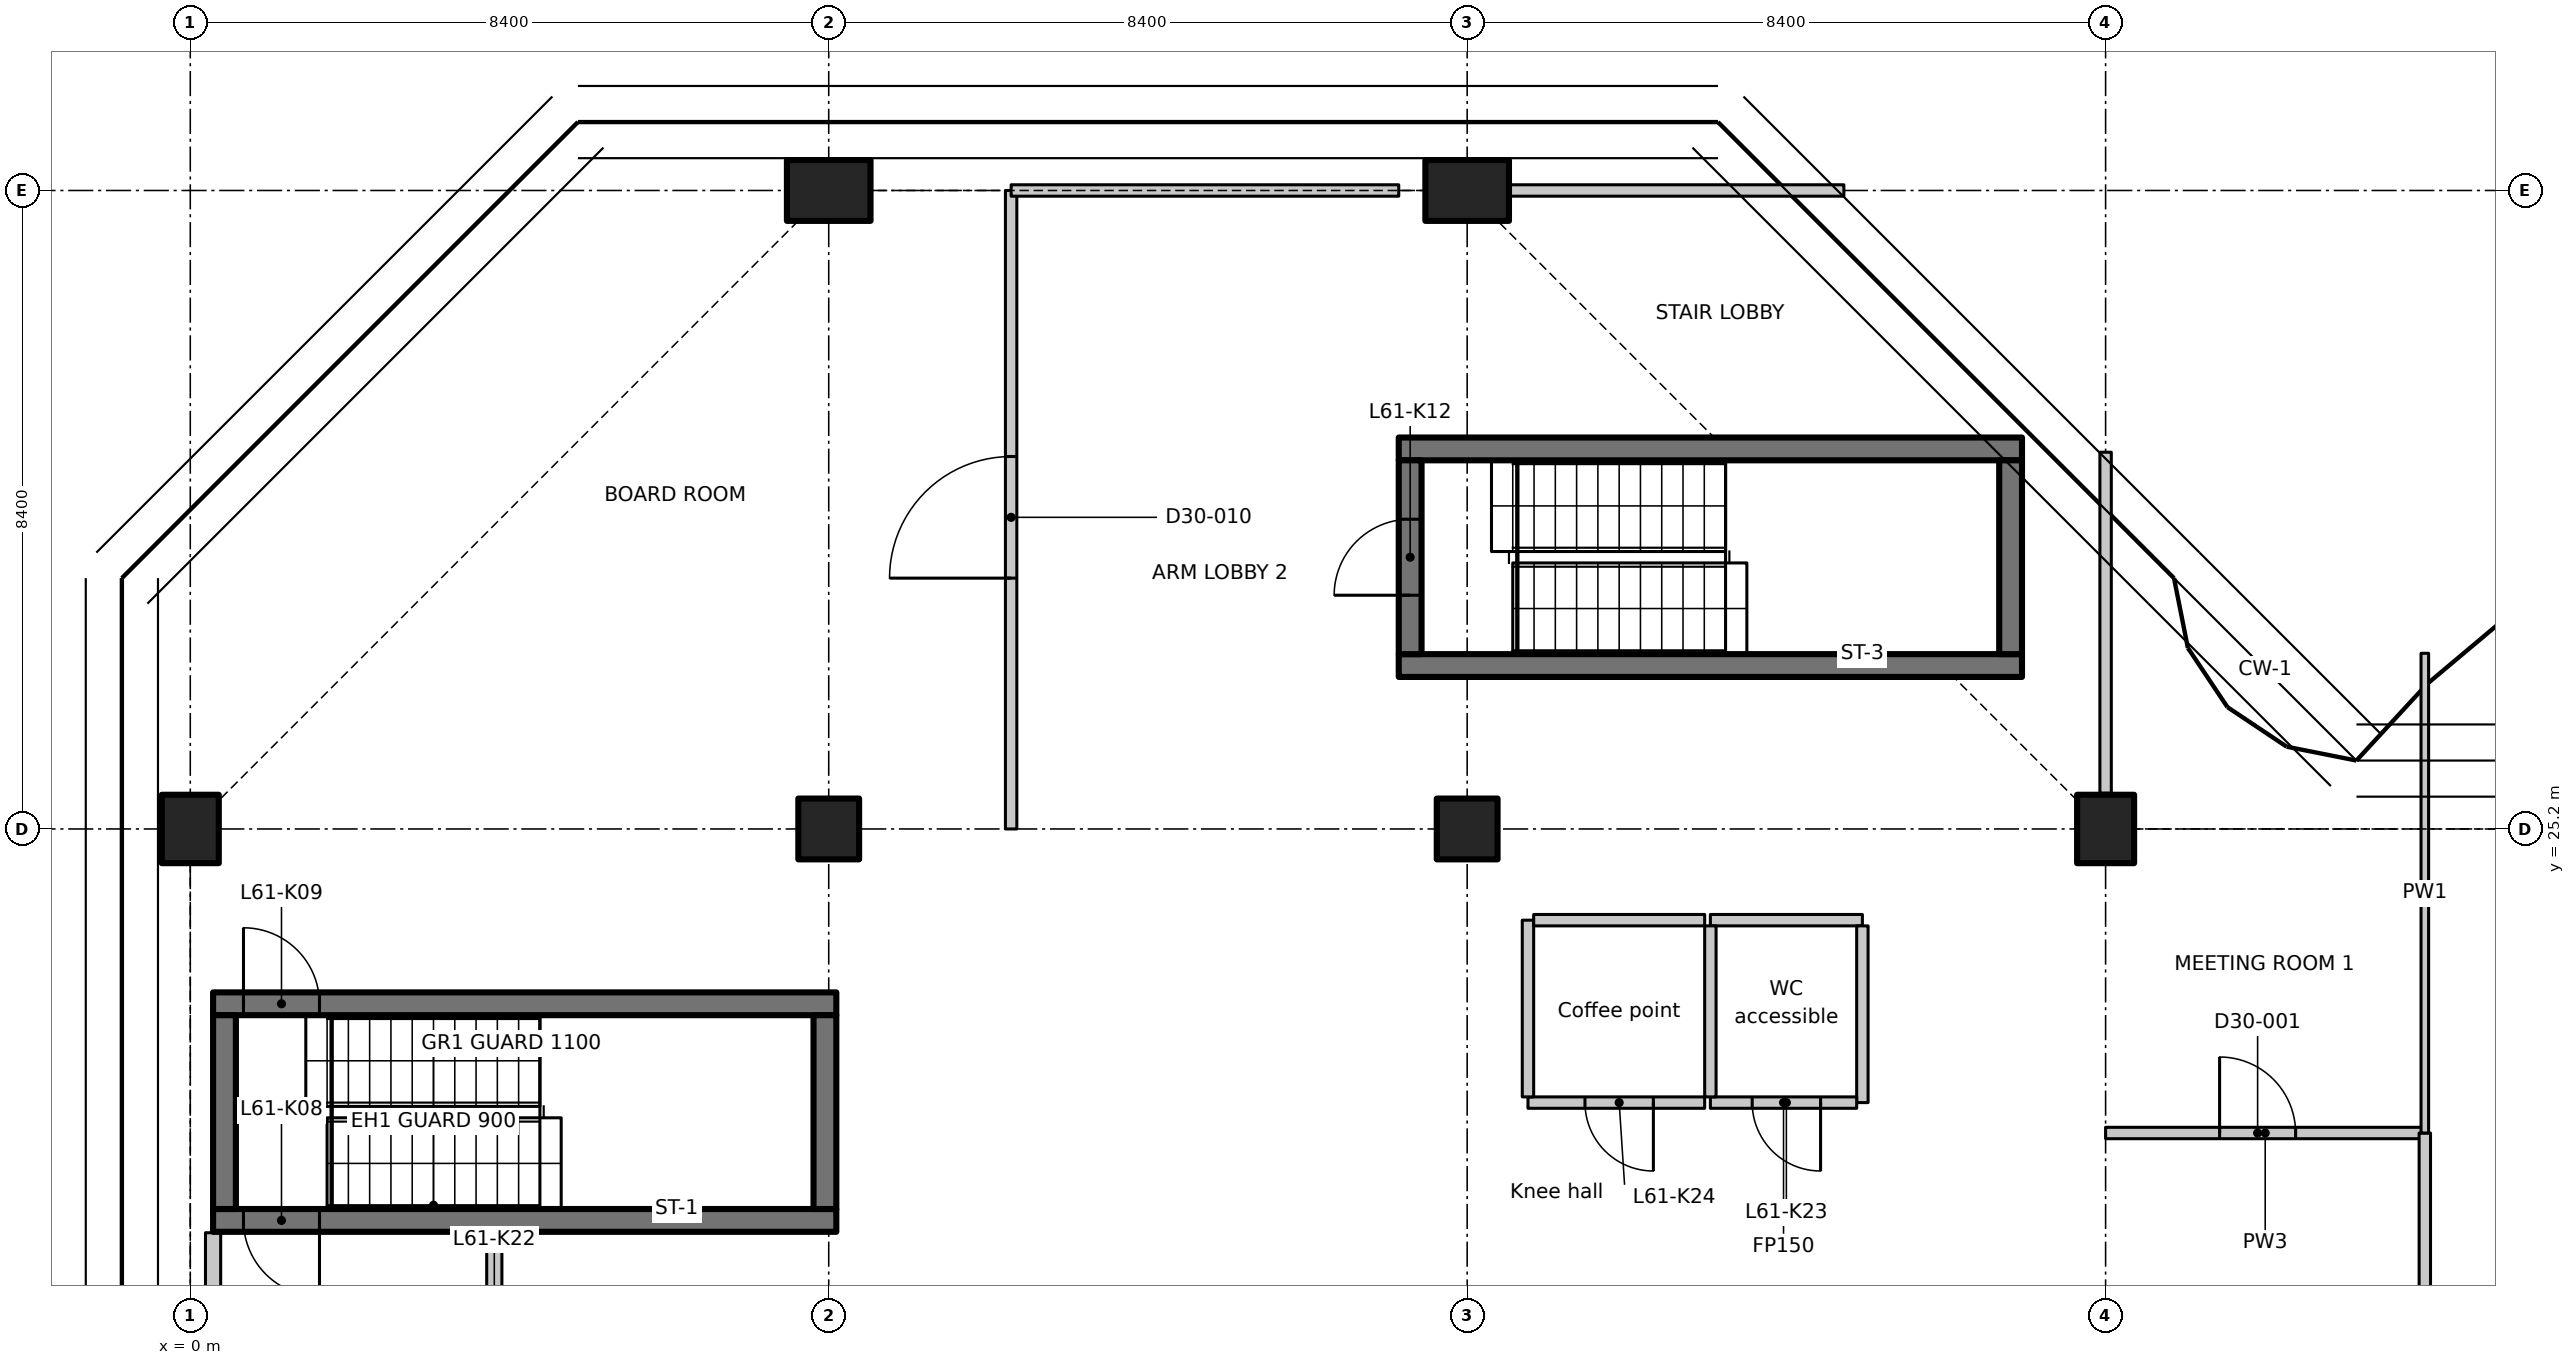
"""IFC4 building model, lengths in metres.
Left out: names, types, materials, properties, quantities, classifications, styles, units other than length and angle.
Written with IfcOpenShell. Run it as: python <this file> out.ifc"""

import sys

from ifc_helpers import new_model, si_unit, direction, frame, frame_2d, origin, origin_2d, place, context, subcontext, project, spatial, polyline, rectangle, outline, extrude, element, fill, save


model = new_model("IFC4")
c1 = context("Model", 3, precision=1e-05, world=origin(), true_north=direction((0.0, 1.0)))
c2 = subcontext(c1, "Body", "Model", "MODEL_VIEW")
j1 = project(units=[si_unit("LENGTHUNIT", "METRE"), si_unit("PLANEANGLEUNIT", "RADIAN")], contexts=[c1])
p1 = place(None, origin())
s1 = spatial("IfcSite", under=j1, at=p1, CompositionType="ELEMENT")
p2 = place(p1, origin())
s2 = spatial("IfcBuilding", under=s1, at=p2, CompositionType="ELEMENT")
p3 = place(p2, frame((0.0, 0.0, 240.9)))
s3 = spatial("IfcBuildingStorey", under=s2, at=p3, CompositionType="ELEMENT", Elevation=240.9)
p4 = place(p3, frame((0.0, 25.2, 0.0), z_axis=(0.0, 0.0, 1.0), x_axis=(1.0, 0.0, 0.0)))
e1 = element("IfcColumn", 1, at=p4, inside=s3, PredefinedType="COLUMN", context=c2, shape_type="SweptSolid", body=[
    extrude(rectangle(XDim=0.75, YDim=0.9, at=origin_2d()), origin(), (0.0, 0.0, 1.0), 3.35),
])
p5 = place(p3, frame((8.4, 25.2, 0.0), z_axis=(0.0, 0.0, 1.0), x_axis=(1.0, 0.0, 0.0)))
e2 = element("IfcColumn", 2, at=p5, inside=s3, PredefinedType="COLUMN", context=c2, shape_type="SweptSolid", body=[
    extrude(rectangle(XDim=0.8, YDim=0.8, at=origin_2d()), origin(), (0.0, 0.0, 1.0), 3.35),
])
p6 = place(p3, frame((8.4, 33.6, 0.0), z_axis=(0.0, 0.0, 1.0), x_axis=(0.0, 1.0, 0.0)))
e3 = element("IfcColumn", 3, at=p6, inside=s3, PredefinedType="COLUMN", context=c2, shape_type="SweptSolid", body=[
    extrude(rectangle(XDim=0.8, YDim=1.1, at=origin_2d()), origin(), (0.0, 0.0, 1.0), 3.35),
])
p7 = place(p3, frame((16.8, 25.2, 0.0), z_axis=(0.0, 0.0, 1.0), x_axis=(1.0, 0.0, 0.0)))
e4 = element("IfcColumn", 4, at=p7, inside=s3, PredefinedType="COLUMN", context=c2, shape_type="SweptSolid", body=[
    extrude(rectangle(XDim=0.8, YDim=0.8, at=origin_2d()), origin(), (0.0, 0.0, 1.0), 3.35),
])
p8 = place(p3, frame((16.8, 33.6, 0.0), z_axis=(0.0, 0.0, 1.0), x_axis=(0.0, 1.0, 0.0)))
e5 = element("IfcColumn", 5, at=p8, inside=s3, PredefinedType="COLUMN", context=c2, shape_type="SweptSolid", body=[
    extrude(rectangle(XDim=0.8, YDim=1.1, at=origin_2d()), origin(), (0.0, 0.0, 1.0), 3.35),
])
p9 = place(p3, frame((25.2, 25.2, 0.0), z_axis=(0.0, 0.0, 1.0), x_axis=(1.0, 0.0, 0.0)))
e6 = element("IfcColumn", 6, at=p9, inside=s3, PredefinedType="COLUMN", context=c2, shape_type="SweptSolid", body=[
    extrude(rectangle(XDim=0.75, YDim=0.9, at=origin_2d()), origin(), (0.0, 0.0, 1.0), 3.35),
])
p10 = place(p3, frame((8.5, 20.05, 0.0), z_axis=(0.0, 0.0, 1.0), x_axis=(-1.0, 0.0, 0.0)))
e7 = element("IfcWall", 7, at=p10, inside=s3, PredefinedType="SHEAR", context=c2, shape_type="SweptSolid", body=[
    extrude(rectangle(XDim=8.2, YDim=0.3, at=frame_2d((4.1, 0.0))), origin(), (0.0, 0.0, 1.0), 3.35),
])
p11 = place(p10, frame((6.8, 0.0, 0.0)))
e8 = element("IfcOpeningElement", 8, at=p11, cuts=e7, PredefinedType="OPENING", context=c2, shape_type="SweptSolid", body=[
    extrude(rectangle(XDim=1.0, YDim=2.1, at=frame_2d((0.5, 1.05))), frame((0.0, 0.16, 0.0), z_axis=(0.0, -1.0, 0.0), x_axis=(1.0, 0.0, 0.0)), (0.0, 0.0, 1.0), 0.32),
])
p12 = place(p3, frame((0.3, 22.9, 0.0), z_axis=(0.0, 0.0, 1.0), x_axis=(1.0, 0.0, 0.0)))
e9 = element("IfcWall", 9, at=p12, inside=s3, PredefinedType="SHEAR", context=c2, shape_type="SweptSolid", body=[
    extrude(rectangle(XDim=8.2, YDim=0.3, at=frame_2d((4.1, 0.0))), origin(), (0.0, 0.0, 1.0), 3.35),
])
p13 = place(p12, frame((0.4, 0.0, 0.0)))
e10 = element("IfcOpeningElement", 10, at=p13, cuts=e9, PredefinedType="OPENING", context=c2, shape_type="SweptSolid", body=[
    extrude(rectangle(XDim=1.0, YDim=2.1, at=frame_2d((0.5, 1.05))), frame((0.0, 0.16, 0.0), z_axis=(0.0, -1.0, 0.0), x_axis=(1.0, 0.0, 0.0)), (0.0, 0.0, 1.0), 0.32),
])
for number, where, z_axis, x_axis in (
    (11, (0.45, 20.2, 0.0), (0.0, 0.0, 1.0), (0.0, 1.0, 0.0)),
    (12, (8.35, 20.2, 0.0), (0.0, 0.0, 1.0), (0.0, 1.0, 0.0)),
):
    element("IfcWall", number, at=place(p3, frame(where, z_axis=z_axis, x_axis=x_axis)), inside=s3, PredefinedType="SHEAR", context=c2, shape_type="SweptSolid", body=[
        extrude(rectangle(XDim=2.55, YDim=0.3, at=frame_2d((1.275, 0.0))), origin(), (0.0, 0.0, 1.0), 3.35),
    ])
for number, where, z_axis, x_axis in (
    (13, (15.9, 27.35, 0.0), (0.0, 0.0, 1.0), (1.0, 0.0, 0.0)),
    (14, (15.9, 30.2, 0.0), (0.0, 0.0, 1.0), (1.0, 0.0, 0.0)),
):
    element("IfcWall", number, at=place(p3, frame(where, z_axis=z_axis, x_axis=x_axis)), inside=s3, PredefinedType="SHEAR", context=c2, shape_type="SweptSolid", body=[
        extrude(rectangle(XDim=8.2, YDim=0.3, at=frame_2d((4.1, 0.0))), origin(), (0.0, 0.0, 1.0), 3.35),
    ])
p14 = place(p3, frame((16.05, 27.5, 0.0), z_axis=(0.0, 0.0, 1.0), x_axis=(0.0, 1.0, 0.0)))
e15 = element("IfcWall", 15, at=p14, inside=s3, PredefinedType="SHEAR", context=c2, shape_type="SweptSolid", body=[
    extrude(rectangle(XDim=2.55, YDim=0.3, at=frame_2d((1.275, 0.0))), origin(), (0.0, 0.0, 1.0), 3.35),
])
p15 = place(p14, frame((0.775, 0.0, 0.0)))
e16 = element("IfcOpeningElement", 16, at=p15, cuts=e15, PredefinedType="OPENING", context=c2, shape_type="SweptSolid", body=[
    extrude(rectangle(XDim=1.0, YDim=2.1, at=frame_2d((0.5, 1.05))), frame((0.0, 0.16, 0.0), z_axis=(0.0, -1.0, 0.0), x_axis=(1.0, 0.0, 0.0)), (0.0, 0.0, 1.0), 0.32),
])
p16 = place(p3, frame((23.95, 27.5, 0.0), z_axis=(0.0, 0.0, 1.0), x_axis=(0.0, 1.0, 0.0)))
e17 = element("IfcWall", 17, at=p16, inside=s3, PredefinedType="SHEAR", context=c2, shape_type="SweptSolid", body=[
    extrude(rectangle(XDim=2.55, YDim=0.3, at=frame_2d((1.275, 0.0))), origin(), (0.0, 0.0, 1.0), 3.35),
])
p17 = place(p3, frame((0.3, 16.812, 0.0), z_axis=(0.0, 0.0, 1.0), x_axis=(0.0, 1.0, 0.0)))
e18 = element("IfcWall", 18, at=p17, inside=s3, PredefinedType="PARTITIONING", context=c2, shape_type="SweptSolid", body=[
    extrude(rectangle(XDim=3.076, YDim=0.2, at=frame_2d((1.538, 0.0))), origin(), (0.0, 0.0, 1.0), 2.98),
])
p18 = place(p3, frame((4.0, 19.888, 0.0), z_axis=(0.0, 0.0, 1.0), x_axis=(0.0, -1.0, 0.0)))
e19 = element("IfcWall", 19, at=p18, inside=s3, PredefinedType="PARTITIONING", context=c2, shape_type="SweptSolid", body=[
    extrude(rectangle(XDim=3.076, YDim=0.2, at=frame_2d((1.538, 0.0))), origin(), (0.0, 0.0, 1.0), 3.35),
])
p19 = place(p18, frame((1.488, 0.0, 0.0)))
e20 = element("IfcOpeningElement", 20, at=p19, cuts=e19, PredefinedType="OPENING", context=c2, shape_type="SweptSolid", body=[
    extrude(rectangle(XDim=1.0, YDim=2.1, at=frame_2d((0.5, 1.05))), frame((0.0, 0.11, 0.0), z_axis=(0.0, -1.0, 0.0), x_axis=(1.0, 0.0, 0.0)), (0.0, 0.0, 1.0), 0.22),
])
p20 = place(p3, frame((20.0, 24.0, 0.0), z_axis=(0.0, 0.0, 1.0), x_axis=(1.0, 0.0, 0.0)))
e21 = element("IfcWall", 21, at=p20, inside=s3, PredefinedType="PARTITIONING", context=c2, shape_type="SweptSolid", body=[
    extrude(rectangle(XDim=2.0, YDim=0.15, at=frame_2d((1.0, 0.0))), origin(), (0.0, 0.0, 1.0), 3.35),
])
p21 = place(p3, frame((22.0, 23.925, 0.0), z_axis=(0.0, 0.0, 1.0), x_axis=(0.0, -1.0, 0.0)))
e22 = element("IfcWall", 22, at=p21, inside=s3, PredefinedType="PARTITIONING", context=c2, shape_type="SweptSolid", body=[
    extrude(rectangle(XDim=2.325, YDim=0.15, at=frame_2d((1.163, 0.0))), origin(), (0.0, 0.0, 1.0), 3.35),
])
p22 = place(p3, frame((21.925, 21.6, 0.0), z_axis=(0.0, 0.0, 1.0), x_axis=(-1.0, 0.0, 0.0)))
e23 = element("IfcWall", 23, at=p22, inside=s3, PredefinedType="PARTITIONING", context=c2, shape_type="SweptSolid", body=[
    extrude(rectangle(XDim=1.925, YDim=0.15, at=frame_2d((0.962, 0.0))), origin(), (0.0, 0.0, 1.0), 3.35),
])
p23 = place(p22, frame((0.475, 0.0, 0.0)))
e24 = element("IfcOpeningElement", 24, at=p23, cuts=e23, PredefinedType="OPENING", context=c2, shape_type="SweptSolid", body=[
    extrude(rectangle(XDim=0.9, YDim=2.1, at=frame_2d((0.45, 1.05))), frame((0.0, 0.085, 0.0), z_axis=(0.0, -1.0, 0.0), x_axis=(1.0, 0.0, 0.0)), (0.0, 0.0, 1.0), 0.17),
])
p24 = place(p3, frame((20.0, 21.675, 0.0), z_axis=(0.0, 0.0, 1.0), x_axis=(0.0, 1.0, 0.0)))
e25 = element("IfcWall", 25, at=p24, inside=s3, PredefinedType="PARTITIONING", context=c2, shape_type="SweptSolid", body=[
    extrude(rectangle(XDim=2.25, YDim=0.15, at=frame_2d((1.125, 0.0))), origin(), (0.0, 0.0, 1.0), 3.35),
])
p25 = place(p3, frame((19.925, 21.6, 0.0), z_axis=(0.0, 0.0, 1.0), x_axis=(-1.0, 0.0, 0.0)))
e26 = element("IfcWall", 26, at=p25, inside=s3, PredefinedType="PARTITIONING", context=c2, shape_type="SweptSolid", body=[
    extrude(rectangle(XDim=2.325, YDim=0.15, at=frame_2d((1.163, 0.0))), origin(), (0.0, 0.0, 1.0), 3.35),
])
p26 = place(p25, frame((0.675, 0.0, 0.0)))
e27 = element("IfcOpeningElement", 27, at=p26, cuts=e26, PredefinedType="OPENING", context=c2, shape_type="SweptSolid", body=[
    extrude(rectangle(XDim=0.9, YDim=2.1, at=frame_2d((0.45, 1.05))), frame((0.0, 0.085, 0.0), z_axis=(0.0, -1.0, 0.0), x_axis=(1.0, 0.0, 0.0)), (0.0, 0.0, 1.0), 0.17),
])
p27 = place(p3, frame((17.6, 21.675, 0.0), z_axis=(0.0, 0.0, 1.0), x_axis=(0.0, 1.0, 0.0)))
e28 = element("IfcWall", 28, at=p27, inside=s3, PredefinedType="PARTITIONING", context=c2, shape_type="SweptSolid", body=[
    extrude(rectangle(XDim=2.325, YDim=0.15, at=frame_2d((1.163, 0.0))), origin(), (0.0, 0.0, 1.0), 3.35),
])
p28 = place(p3, frame((17.675, 24.0, 0.0), z_axis=(0.0, 0.0, 1.0), x_axis=(1.0, 0.0, 0.0)))
e29 = element("IfcWall", 29, at=p28, inside=s3, PredefinedType="PARTITIONING", context=c2, shape_type="SweptSolid", body=[
    extrude(rectangle(XDim=2.25, YDim=0.15, at=frame_2d((1.125, 0.0))), origin(), (0.0, 0.0, 1.0), 3.35),
])
p29 = place(p3, frame((25.2, 21.2, 0.0), z_axis=(0.0, 0.0, 1.0), x_axis=(1.0, 0.0, 0.0)))
e30 = element("IfcWall", 30, at=p29, inside=s3, PredefinedType="PARTITIONING", context=c2, shape_type="SweptSolid", body=[
    extrude(rectangle(XDim=4.2, YDim=0.15, at=frame_2d((2.1, 0.0))), origin(), (0.0, 0.0, 1.0), 3.33),
])
p30 = place(p29, frame((1.5, 0.0, 0.0)))
e31 = element("IfcOpeningElement", 31, at=p30, cuts=e30, PredefinedType="OPENING", context=c2, shape_type="SweptSolid", body=[
    extrude(rectangle(XDim=1.0, YDim=2.1, at=frame_2d((0.5, 1.05))), frame((0.0, 0.085, 0.0), z_axis=(0.0, -1.0, 0.0), x_axis=(1.0, 0.0, 0.0)), (0.0, 0.0, 1.0), 0.17),
])
p31 = place(p3, frame((29.4, 21.2, 0.0), z_axis=(0.0, 0.0, 1.0), x_axis=(0.0, -1.0, 0.0)))
e32 = element("IfcWall", 32, at=p31, inside=s3, PredefinedType="PARTITIONING", context=c2, shape_type="SweptSolid", body=[
    extrude(rectangle(XDim=8.2, YDim=0.15, at=frame_2d((4.1, 0.0))), origin(), (0.0, 0.0, 1.0), 3.33),
])
p32 = place(p31, frame((3.3, 0.0, 0.0)))
e33 = element("IfcOpeningElement", 33, at=p32, cuts=e32, PredefinedType="OPENING", context=c2, shape_type="SweptSolid", body=[
    extrude(rectangle(XDim=1.6, YDim=2.1, at=frame_2d((0.8, 1.05))), frame((0.0, 0.085, 0.0), z_axis=(0.0, -1.0, 0.0), x_axis=(1.0, 0.0, 0.0)), (0.0, 0.0, 1.0), 0.17),
])
p33 = place(p3, frame((29.4, 27.511, 0.0), z_axis=(0.0, 0.0, 1.0), x_axis=(0.0, -1.0, 0.0)))
e34 = element("IfcWall", 34, at=p33, inside=s3, PredefinedType="PARTITIONING", context=c2, shape_type="SweptSolid", body=[
    extrude(outline(polyline([(0.0, 0.0), (6.311, 0.0), (6.311, 3.33), (2.761, 3.33), (2.759, 2.98), (1.863, 2.98), (1.861, 3.33), (0.236, 3.33), (0.0, 3.33), (0.0, 0.0)])), frame((0.0, 0.05, 0.0), z_axis=(0.0, -1.0, 0.0), x_axis=(1.0, 0.0, 0.0)), (0.0, 0.0, 1.0), 0.1),
])
p34 = place(p3, frame((25.2, 25.67, 0.0), z_axis=(0.0, 0.0, 1.0), x_axis=(0.0, 1.0, 0.0)))
e35 = element("IfcWall", 35, at=p34, inside=s3, PredefinedType="PARTITIONING", context=c2, shape_type="SweptSolid", body=[
    extrude(rectangle(XDim=4.487, YDim=0.15, at=frame_2d((2.243, 0.0))), origin(), (0.0, 0.0, 1.0), 2.98),
])
p35 = place(p3, frame((10.8, 25.2, 0.0), z_axis=(0.0, 0.0, 1.0), x_axis=(0.0, 1.0, 0.0)))
e36 = element("IfcWall", 36, at=p35, inside=s3, PredefinedType="PARTITIONING", context=c2, shape_type="SweptSolid", body=[
    extrude(outline(polyline([(0.0, 0.0), (8.4, 0.0), (8.4, 2.98), (7.952, 2.98), (7.95, 3.33), (0.0, 3.33), (0.0, 0.0)])), frame((0.0, 0.075, 0.0), z_axis=(0.0, -1.0, 0.0), x_axis=(1.0, 0.0, 0.0)), (0.0, 0.0, 1.0), 0.15),
])
p36 = place(p35, frame((3.3, 0.0, 0.0)))
e37 = element("IfcOpeningElement", 37, at=p36, cuts=e36, PredefinedType="OPENING", context=c2, shape_type="SweptSolid", body=[
    extrude(rectangle(XDim=1.6, YDim=2.1, at=frame_2d((0.8, 1.05))), frame((0.0, 0.085, 0.0), z_axis=(0.0, -1.0, 0.0), x_axis=(1.0, 0.0, 0.0)), (0.0, 0.0, 1.0), 0.17),
])
p37 = place(p3, frame((10.8, 33.6, 0.0), z_axis=(0.0, 0.0, 1.0), x_axis=(1.0, 0.0, 0.0)))
e38 = element("IfcWall", 38, at=p37, inside=s3, PredefinedType="PARTITIONING", context=c2, shape_type="SweptSolid", body=[
    extrude(outline(polyline([(0.0, 0.0), (5.1, 0.0), (5.1, 2.98), (0.0, 2.98), (0.0, 0.0)])), frame((0.0, 0.075, 0.0), z_axis=(0.0, -1.0, 0.0), x_axis=(1.0, 0.0, 0.0)), (0.0, 0.0, 1.0), 0.15),
])
p38 = place(p3, frame((17.37, 33.6, 0.0), z_axis=(0.0, 0.0, 1.0), x_axis=(1.0, 0.0, 0.0)))
e39 = element("IfcWall", 39, at=p38, inside=s3, PredefinedType="PARTITIONING", context=c2, shape_type="SweptSolid", body=[
    extrude(rectangle(XDim=4.386, YDim=0.15, at=frame_2d((2.193, 0.0))), origin(), (0.0, 0.0, 1.0), 2.98),
])
p39 = place(p11, origin())
e40 = element("IfcDoor", 40, at=p39, inside=s3, OperationType="SINGLE_SWING_LEFT", PredefinedType="DOOR", context=c2, shape_type="SweptSolid", body=[
    extrude(rectangle(XDim=1.0, YDim=2.1, at=frame_2d((0.5, 1.05))), frame((0.0, 0.025, 0.0), z_axis=(0.0, -1.0, 0.0), x_axis=(1.0, 0.0, 0.0)), (0.0, 0.0, 1.0), 0.05),
])
fill(e8, e40)
p40 = place(p13, origin())
e41 = element("IfcDoor", 41, at=p40, inside=s3, OperationType="SINGLE_SWING_RIGHT", PredefinedType="DOOR", context=c2, shape_type="SweptSolid", body=[
    extrude(rectangle(XDim=1.0, YDim=2.1, at=frame_2d((0.5, 1.05))), frame((0.0, 0.025, 0.0), z_axis=(0.0, -1.0, 0.0), x_axis=(1.0, 0.0, 0.0)), (0.0, 0.0, 1.0), 0.05),
])
fill(e10, e41)
p41 = place(p15, origin())
e42 = element("IfcDoor", 42, at=p41, inside=s3, OperationType="SINGLE_SWING_LEFT", PredefinedType="DOOR", context=c2, shape_type="SweptSolid", body=[
    extrude(rectangle(XDim=1.0, YDim=2.1, at=frame_2d((0.5, 1.05))), frame((0.0, 0.025, 0.0), z_axis=(0.0, -1.0, 0.0), x_axis=(1.0, 0.0, 0.0)), (0.0, 0.0, 1.0), 0.05),
])
fill(e16, e42)
p42 = place(p23, origin())
e43 = element("IfcDoor", 43, at=p42, inside=s3, OperationType="SINGLE_SWING_RIGHT", PredefinedType="DOOR", context=c2, shape_type="SweptSolid", body=[
    extrude(rectangle(XDim=0.9, YDim=2.1, at=frame_2d((0.45, 1.05))), frame((0.0, 0.025, 0.0), z_axis=(0.0, -1.0, 0.0), x_axis=(1.0, 0.0, 0.0)), (0.0, 0.0, 1.0), 0.05),
])
fill(e24, e43)
p43 = place(p26, origin())
e44 = element("IfcDoor", 44, at=p43, inside=s3, OperationType="SINGLE_SWING_LEFT", PredefinedType="DOOR", context=c2, shape_type="SweptSolid", body=[
    extrude(rectangle(XDim=0.9, YDim=2.1, at=frame_2d((0.45, 1.05))), frame((0.0, 0.025, 0.0), z_axis=(0.0, -1.0, 0.0), x_axis=(1.0, 0.0, 0.0)), (0.0, 0.0, 1.0), 0.05),
])
fill(e27, e44)
p44 = place(p30, origin())
e45 = element("IfcDoor", 45, at=p44, inside=s3, OperationType="SINGLE_SWING_LEFT", PredefinedType="DOOR", context=c2, shape_type="SweptSolid", body=[
    extrude(rectangle(XDim=1.0, YDim=2.1, at=frame_2d((0.5, 1.05))), frame((0.0, 0.025, 0.0), z_axis=(0.0, -1.0, 0.0), x_axis=(1.0, 0.0, 0.0)), (0.0, 0.0, 1.0), 0.05),
])
fill(e31, e45)
p45 = place(p36, origin())
e46 = element("IfcDoor", 46, at=p45, inside=s3, OperationType="DOUBLE_DOOR_SINGLE_SWING", PredefinedType="DOOR", context=c2, shape_type="SweptSolid", body=[
    extrude(rectangle(XDim=1.6, YDim=2.1, at=frame_2d((0.8, 1.05))), frame((0.0, 0.025, 0.0), z_axis=(0.0, -1.0, 0.0), x_axis=(1.0, 0.0, 0.0)), (0.0, 0.0, 1.0), 0.05),
])
fill(e37, e46)
save(model, sys.argv[1])
